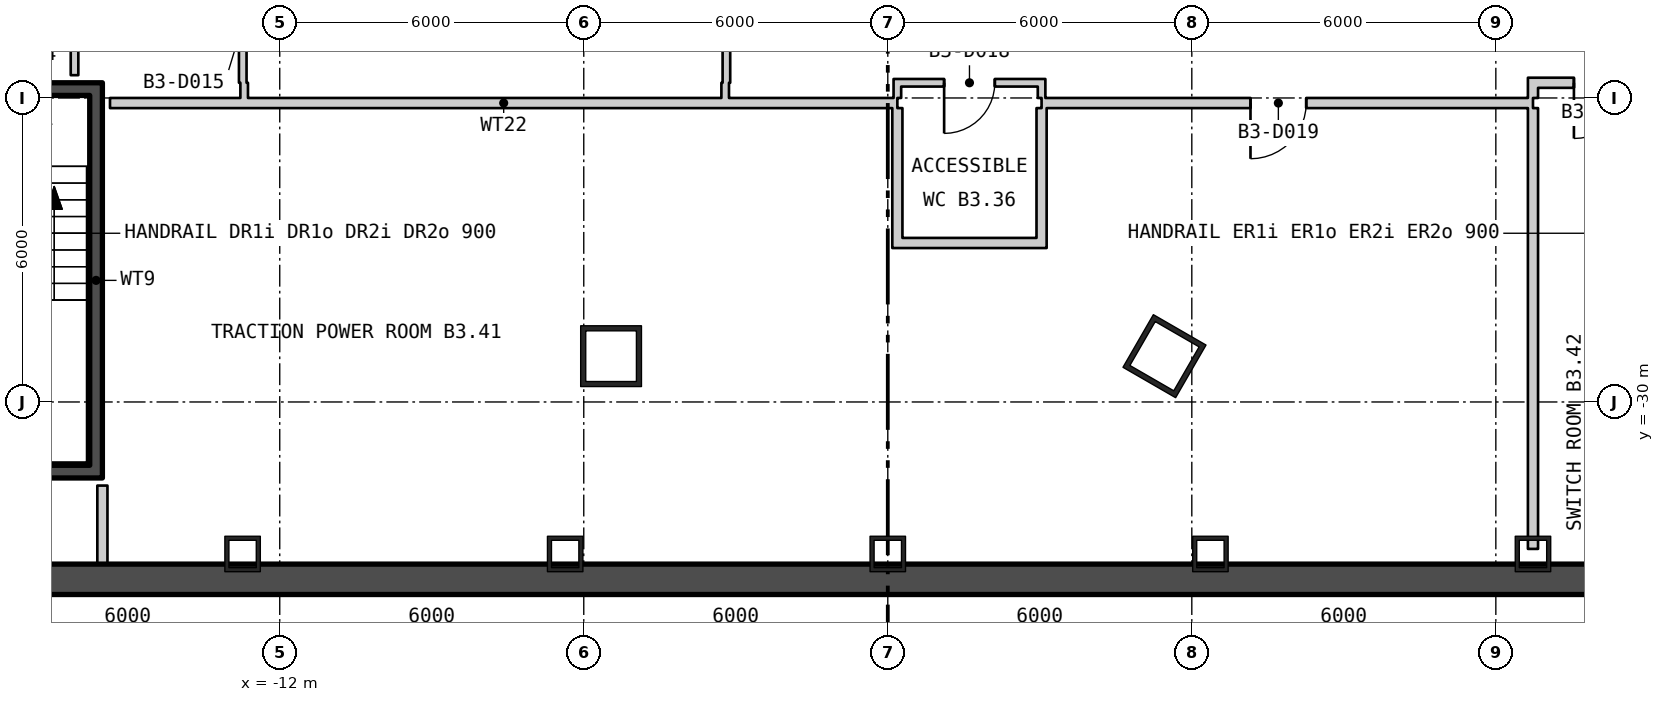
"""IFC4 building model, lengths in metres.
Left out: names, types, materials, properties, quantities, classifications, styles, units other than length and angle.
Written with IfcOpenShell. Run it as: python <this file> out.ifc"""

import sys

from ifc_helpers import new_model, si_unit, direction, frame, frame_2d, origin, origin_2d, place, context, subcontext, project, spatial, rectangle, hollow_rectangle, extrude, element, fill, save


model = new_model("IFC4")
c1 = context("Model", 3, precision=1e-05, world=origin(), true_north=direction((0.0, 1.0)))
c2 = subcontext(c1, "Body", "Model", "MODEL_VIEW")
j1 = project(units=[si_unit("LENGTHUNIT", "METRE"), si_unit("PLANEANGLEUNIT", "RADIAN")], contexts=[c1])
p1 = place(None, origin())
s1 = spatial("IfcSite", under=j1, at=p1, CompositionType="ELEMENT")
p2 = place(p1, origin())
s2 = spatial("IfcBuilding", under=s1, at=p2, CompositionType="ELEMENT")
p3 = place(p2, frame((0.0, 0.0, -16.8)))
s3 = spatial("IfcBuildingStorey", under=s2, at=p3, CompositionType="ELEMENT", Elevation=-16.8)
for number, where, z_axis, x_axis in (
    (1, (-5.461, -29.096, 0.0), (0.0, 0.0, 1.0), (1.0, 0.0, 0.0)),
    (2, (5.461, -29.096, 0.0), (0.0, 0.0, 1.0), (0.5, 0.866, 0.0)),
):
    element("IfcColumn", number, at=place(p3, frame(where, z_axis=z_axis, x_axis=x_axis)), inside=s3, PredefinedType="COLUMN", context=c2, shape_type="SweptSolid", body=[
        extrude(hollow_rectangle(XDim=1.2, YDim=1.2, WallThickness=0.1, at=origin_2d()), origin(), (0.0, 0.0, 1.0), 5.4),
    ])
for number, where, z_axis, x_axis in (
    (3, (-12.733, -33.0, 0.0), (0.0, 0.0, 1.0), (1.0, 0.0, 0.0)),
    (4, (-6.367, -33.0, 0.0), (0.0, 0.0, 1.0), (1.0, 0.0, 0.0)),
    (5, (0.0, -33.0, 0.0), (0.0, 0.0, 1.0), (1.0, 0.0, 0.0)),
    (6, (6.367, -33.0, 0.0), (0.0, 0.0, 1.0), (1.0, 0.0, 0.0)),
    (7, (12.733, -33.0, 0.0), (0.0, 0.0, 1.0), (1.0, 0.0, 0.0)),
):
    element("IfcColumn", number, at=place(p3, frame(where, z_axis=z_axis, x_axis=x_axis)), inside=s3, PredefinedType="COLUMN", context=c2, shape_type="SweptSolid", body=[
        extrude(hollow_rectangle(XDim=0.7, YDim=0.7, WallThickness=0.08, at=origin_2d()), origin(), (0.0, 0.0, 1.0), 5.4),
    ])
p4 = place(p3, frame((-39.0, -33.5, -0.4), z_axis=(0.0, 0.0, 1.0), x_axis=(1.0, 0.0, 0.0)))
e8 = element("IfcWall", 8, at=p4, inside=s3, PredefinedType="STANDARD", context=c2, shape_type="SweptSolid", body=[
    extrude(rectangle(XDim=78.0, YDim=0.6, at=frame_2d((39.0, 0.0))), origin(), (0.0, 0.0, 1.0), 5.4),
])
p5 = place(p3, frame((-15.625, -31.25, 0.0), z_axis=(0.0, 0.0, 1.0), x_axis=(0.0, 1.0, 0.0)))
e9 = element("IfcWall", 9, at=p5, inside=s3, PredefinedType="SHEAR", context=c2, shape_type="SweptSolid", body=[
    extrude(rectangle(XDim=7.3, YDim=0.25, at=frame_2d((3.65, 0.0))), origin(), (0.0, 0.0, 1.0), 4.95),
])
p6 = place(p3, frame((-19.0, -31.375, 0.0), z_axis=(0.0, 0.0, 1.0), x_axis=(1.0, 0.0, 0.0)))
e10 = element("IfcWall", 10, at=p6, inside=s3, PredefinedType="SHEAR", context=c2, shape_type="SweptSolid", body=[
    extrude(rectangle(XDim=3.5, YDim=0.25, at=frame_2d((1.75, 0.0))), origin(), (0.0, 0.0, 1.0), 4.95),
])
p7 = place(p3, frame((-19.0, -23.825, 0.0), z_axis=(0.0, 0.0, 1.0), x_axis=(1.0, 0.0, 0.0)))
e11 = element("IfcWall", 11, at=p7, inside=s3, PredefinedType="SHEAR", context=c2, shape_type="SweptSolid", body=[
    extrude(rectangle(XDim=3.5, YDim=0.25, at=frame_2d((1.75, 0.0))), origin(), (0.0, 0.0, 1.0), 4.95),
])
p8 = place(p7, frame((1.15, 0.0, 0.0)))
e12 = element("IfcOpeningElement", 12, at=p8, cuts=e11, PredefinedType="OPENING", context=c2, shape_type="SweptSolid", body=[
    extrude(rectangle(XDim=1.2, YDim=2.1, at=frame_2d((0.6, 1.05))), frame((0.0, 0.135, 0.0), z_axis=(0.0, -1.0, 0.0), x_axis=(1.0, 0.0, 0.0)), (0.0, 0.0, 1.0), 0.27),
])
p9 = place(p3, frame((-16.05, -23.55, 0.0), z_axis=(0.0, 0.0, 1.0), x_axis=(0.0, 1.0, 0.0)))
e13 = element("IfcWall", 13, at=p9, inside=s3, PredefinedType="PARTITIONING", context=c2, shape_type="SweptSolid", body=[
    extrude(rectangle(XDim=2.175, YDim=0.15, at=frame_2d((1.087, 0.0))), origin(), (0.0, 0.0, 1.0), 4.95),
])
p10 = place(p9, frame((1.063, 0.0, 0.0)))
e14 = element("IfcOpeningElement", 14, at=p10, cuts=e13, PredefinedType="OPENING", context=c2, shape_type="SweptSolid", body=[
    extrude(rectangle(XDim=1.0, YDim=2.1, at=frame_2d((0.5, 1.05))), frame((0.0, 0.085, 0.0), z_axis=(0.0, -1.0, 0.0), x_axis=(1.0, 0.0, 0.0)), (0.0, 0.0, 1.0), 0.17),
])
p11 = place(p3, frame((-15.5, -33.35, 0.0), z_axis=(0.0, 0.0, 1.0), x_axis=(0.0, 1.0, 0.0)))
e15 = element("IfcWall", 15, at=p11, inside=s3, PredefinedType="PARTITIONING", context=c2, shape_type="SweptSolid", body=[
    extrude(rectangle(XDim=1.7, YDim=0.2, at=frame_2d((0.85, 0.0))), origin(), (0.0, 0.0, 1.0), 4.95),
])
p12 = place(p3, frame((-15.35, -24.1, 0.0), z_axis=(0.0, 0.0, 1.0), x_axis=(1.0, 0.0, 0.0)))
e16 = element("IfcWall", 16, at=p12, inside=s3, PredefinedType="PARTITIONING", context=c2, shape_type="SweptSolid", body=[
    extrude(rectangle(XDim=15.539, YDim=0.2, at=frame_2d((7.769, 0.0))), origin(), (0.0, 0.0, 1.0), 4.95),
])
p13 = place(p3, frame((-12.73, -23.7, 0.0), z_axis=(0.0, 0.0, 1.0), x_axis=(0.0, 1.0, 0.0)))
e17 = element("IfcWall", 17, at=p13, inside=s3, PredefinedType="PARTITIONING", context=c2, shape_type="SweptSolid", body=[
    extrude(rectangle(XDim=2.325, YDim=0.15, at=frame_2d((1.163, 0.0))), origin(), (0.0, 0.0, 1.0), 4.95),
])
p14 = place(p13, frame((0.662, 0.0, 0.0)))
e18 = element("IfcOpeningElement", 18, at=p14, cuts=e17, PredefinedType="OPENING", context=c2, shape_type="SweptSolid", body=[
    extrude(rectangle(XDim=1.0, YDim=2.1, at=frame_2d((0.5, 1.05))), frame((0.0, 0.085, 0.0), z_axis=(0.0, -1.0, 0.0), x_axis=(1.0, 0.0, 0.0)), (0.0, 0.0, 1.0), 0.17),
])
for number, where, z_axis, x_axis in (
    (19, (-12.702, -24.0, 0.0), (0.0, 0.0, 1.0), (0.0, 1.0, 0.0)),
    (20, (-3.209, -24.0, 0.0), (0.0, 0.0, 1.0), (0.0, 1.0, 0.0)),
):
    element("IfcWall", number, at=place(p3, frame(where, z_axis=z_axis, x_axis=x_axis)), inside=s3, PredefinedType="PARTITIONING", context=c2, shape_type="SweptSolid", body=[
        extrude(rectangle(XDim=0.3, YDim=0.15, at=frame_2d((0.15, 0.0))), origin(), (0.0, 0.0, 1.0), 4.95),
    ])
p15 = place(p3, frame((-3.185, -23.7, 0.0), z_axis=(0.0, 0.0, 1.0), x_axis=(0.0, 1.0, 0.0)))
e21 = element("IfcWall", 21, at=p15, inside=s3, PredefinedType="PARTITIONING", context=c2, shape_type="SweptSolid", body=[
    extrude(rectangle(XDim=2.325, YDim=0.15, at=frame_2d((1.163, 0.0))), origin(), (0.0, 0.0, 1.0), 4.95),
])
p16 = place(p15, frame((0.662, 0.0, 0.0)))
e22 = element("IfcOpeningElement", 22, at=p16, cuts=e21, PredefinedType="OPENING", context=c2, shape_type="SweptSolid", body=[
    extrude(rectangle(XDim=1.0, YDim=2.1, at=frame_2d((0.5, 1.05))), frame((0.0, 0.085, 0.0), z_axis=(0.0, -1.0, 0.0), x_axis=(1.0, 0.0, 0.0)), (0.0, 0.0, 1.0), 0.17),
])
p17 = place(p3, frame((0.089, -26.862, 0.0), z_axis=(0.0, 0.0, 1.0), x_axis=(1.0, 0.0, 0.0)))
e23 = element("IfcWall", 23, at=p17, inside=s3, PredefinedType="PARTITIONING", context=c2, shape_type="SweptSolid", body=[
    extrude(rectangle(XDim=3.046, YDim=0.2, at=frame_2d((1.523, 0.0))), origin(), (0.0, 0.0, 1.0), 4.95),
])
p18 = place(p3, frame((0.114, -23.7, 0.0), z_axis=(0.0, 0.0, 1.0), x_axis=(1.0, 0.0, 0.0)))
e24 = element("IfcWall", 24, at=p18, inside=s3, PredefinedType="PARTITIONING", context=c2, shape_type="SweptSolid", body=[
    extrude(rectangle(XDim=2.996, YDim=0.15, at=frame_2d((1.498, 0.0))), origin(), (0.0, 0.0, 1.0), 4.95),
])
p19 = place(p18, frame((0.998, 0.0, 0.0)))
e25 = element("IfcOpeningElement", 25, at=p19, cuts=e24, PredefinedType="OPENING", context=c2, shape_type="SweptSolid", body=[
    extrude(rectangle(XDim=1.0, YDim=2.1, at=frame_2d((0.5, 1.05))), frame((0.0, 0.085, 0.0), z_axis=(0.0, -1.0, 0.0), x_axis=(1.0, 0.0, 0.0)), (0.0, 0.0, 1.0), 0.17),
])
p20 = place(p3, frame((0.189, -26.762, 0.0), z_axis=(0.0, 0.0, 1.0), x_axis=(0.0, 1.0, 0.0)))
e26 = element("IfcWall", 26, at=p20, inside=s3, PredefinedType="PARTITIONING", context=c2, shape_type="SweptSolid", body=[
    extrude(rectangle(XDim=2.562, YDim=0.2, at=frame_2d((1.281, 0.0))), origin(), (0.0, 0.0, 1.0), 4.95),
])
p21 = place(p3, frame((0.189, -24.0, 0.0), z_axis=(0.0, 0.0, 1.0), x_axis=(0.0, 1.0, 0.0)))
e27 = element("IfcWall", 27, at=p21, inside=s3, PredefinedType="PARTITIONING", context=c2, shape_type="SweptSolid", body=[
    extrude(rectangle(XDim=0.225, YDim=0.15, at=frame_2d((0.113, 0.0))), origin(), (0.0, 0.0, 1.0), 4.95),
])
p22 = place(p3, frame((3.035, -26.762, 0.0), z_axis=(0.0, 0.0, 1.0), x_axis=(0.0, 1.0, 0.0)))
e28 = element("IfcWall", 28, at=p22, inside=s3, PredefinedType="PARTITIONING", context=c2, shape_type="SweptSolid", body=[
    extrude(rectangle(XDim=2.562, YDim=0.2, at=frame_2d((1.281, 0.0))), origin(), (0.0, 0.0, 1.0), 4.95),
])
p23 = place(p3, frame((3.035, -24.1, 0.0), z_axis=(0.0, 0.0, 1.0), x_axis=(1.0, 0.0, 0.0)))
e29 = element("IfcWall", 29, at=p23, inside=s3, PredefinedType="PARTITIONING", context=c2, shape_type="SweptSolid", body=[
    extrude(rectangle(XDim=9.698, YDim=0.2, at=frame_2d((4.849, 0.0))), origin(), (0.0, 0.0, 1.0), 4.95),
])
p24 = place(p23, frame((4.123, 0.0, 0.0)))
e30 = element("IfcOpeningElement", 30, at=p24, cuts=e29, PredefinedType="OPENING", context=c2, shape_type="SweptSolid", body=[
    extrude(rectangle(XDim=1.1, YDim=2.1, at=frame_2d((0.55, 1.05))), frame((0.0, 0.11, 0.0), z_axis=(0.0, -1.0, 0.0), x_axis=(1.0, 0.0, 0.0)), (0.0, 0.0, 1.0), 0.22),
])
p25 = place(p3, frame((3.035, -24.0, 0.0), z_axis=(0.0, 0.0, 1.0), x_axis=(0.0, 1.0, 0.0)))
e31 = element("IfcWall", 31, at=p25, inside=s3, PredefinedType="PARTITIONING", context=c2, shape_type="SweptSolid", body=[
    extrude(rectangle(XDim=0.225, YDim=0.15, at=frame_2d((0.113, 0.0))), origin(), (0.0, 0.0, 1.0), 4.95),
])
p26 = place(p3, frame((12.733, -32.9, 0.0), z_axis=(0.0, 0.0, 1.0), x_axis=(0.0, 1.0, 0.0)))
e32 = element("IfcWall", 32, at=p26, inside=s3, PredefinedType="PARTITIONING", context=c2, shape_type="SweptSolid", body=[
    extrude(rectangle(XDim=8.7, YDim=0.2, at=frame_2d((4.35, 0.0))), origin(), (0.0, 0.0, 1.0), 4.95),
])
p27 = place(p3, frame((12.733, -24.0, 0.0), z_axis=(0.0, 0.0, 1.0), x_axis=(0.0, 1.0, 0.0)))
e33 = element("IfcWall", 33, at=p27, inside=s3, PredefinedType="PARTITIONING", context=c2, shape_type="SweptSolid", body=[
    extrude(rectangle(XDim=0.4, YDim=0.2, at=frame_2d((0.2, 0.0))), origin(), (0.0, 0.0, 1.0), 4.95),
])
p28 = place(p3, frame((12.833, -23.7, 0.0), z_axis=(0.0, 0.0, 1.0), x_axis=(1.0, 0.0, 0.0)))
e34 = element("IfcWall", 34, at=p28, inside=s3, PredefinedType="PARTITIONING", context=c2, shape_type="SweptSolid", body=[
    extrude(rectangle(XDim=2.517, YDim=0.2, at=frame_2d((1.258, 0.0))), origin(), (0.0, 0.0, 1.0), 4.95),
])
p29 = place(p28, frame((0.708, 0.0, 0.0)))
e35 = element("IfcOpeningElement", 35, at=p29, cuts=e34, PredefinedType="OPENING", context=c2, shape_type="SweptSolid", body=[
    extrude(rectangle(XDim=1.1, YDim=2.1, at=frame_2d((0.55, 1.05))), frame((0.0, 0.11, 0.0), z_axis=(0.0, -1.0, 0.0), x_axis=(1.0, 0.0, 0.0)), (0.0, 0.0, 1.0), 0.22),
])
p30 = place(p19, origin())
e36 = element("IfcDoor", 36, at=p30, inside=s3, OperationType="SINGLE_SWING_LEFT", PredefinedType="DOOR", context=c2, shape_type="SweptSolid", body=[
    extrude(rectangle(XDim=1.0, YDim=2.1, at=frame_2d((0.5, 1.05))), frame((0.0, 0.025, 0.0), z_axis=(0.0, -1.0, 0.0), x_axis=(1.0, 0.0, 0.0)), (0.0, 0.0, 1.0), 0.05),
])
fill(e25, e36)
p31 = place(p24, origin())
e37 = element("IfcDoor", 37, at=p31, inside=s3, OperationType="SINGLE_SWING_LEFT", PredefinedType="DOOR", context=c2, shape_type="SweptSolid", body=[
    extrude(rectangle(XDim=1.1, YDim=2.1, at=frame_2d((0.55, 1.05))), frame((0.0, 0.025, 0.0), z_axis=(0.0, -1.0, 0.0), x_axis=(1.0, 0.0, 0.0)), (0.0, 0.0, 1.0), 0.05),
])
fill(e30, e37)
p32 = place(p29, origin())
e38 = element("IfcDoor", 38, at=p32, inside=s3, OperationType="SINGLE_SWING_LEFT", PredefinedType="DOOR", context=c2, shape_type="SweptSolid", body=[
    extrude(rectangle(XDim=1.1, YDim=2.1, at=frame_2d((0.55, 1.05))), frame((0.0, 0.025, 0.0), z_axis=(0.0, -1.0, 0.0), x_axis=(1.0, 0.0, 0.0)), (0.0, 0.0, 1.0), 0.05),
])
fill(e35, e38)
save(model, sys.argv[1])
